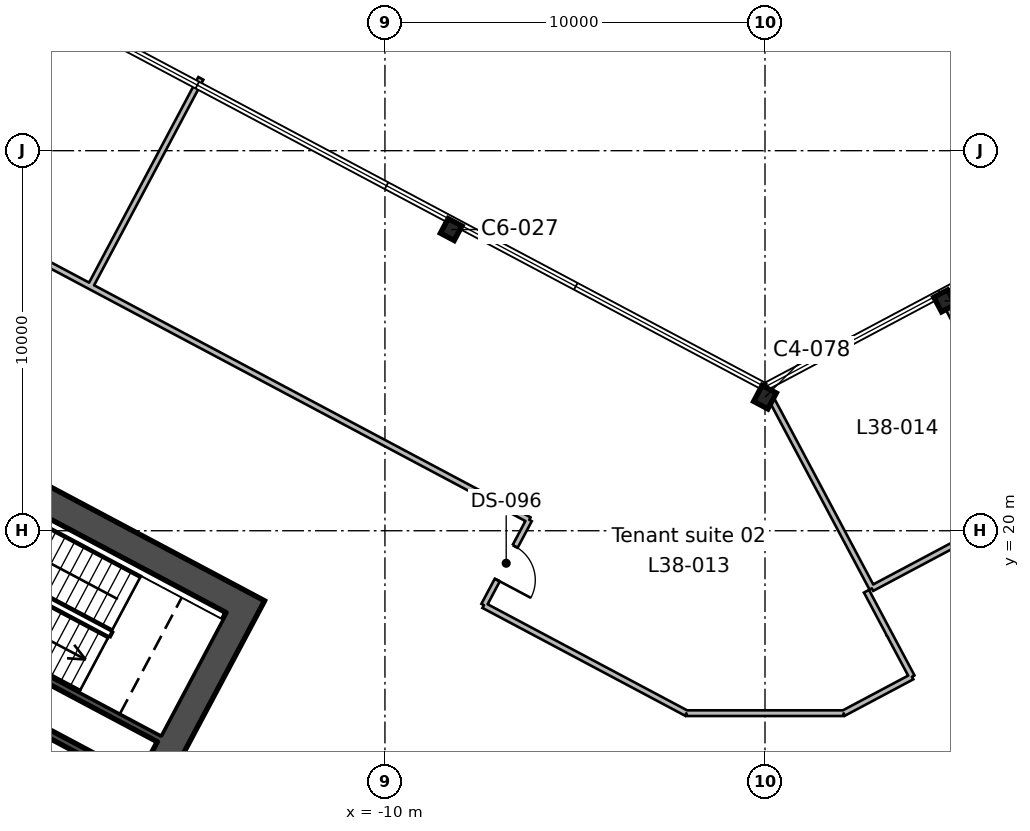
"""IFC4 building model, lengths in metres.
Left out: names, types, materials, properties, quantities, classifications, styles, units other than length and angle.
Written with IfcOpenShell. Run it as: python <this file> out.ifc"""

import sys

from ifc_helpers import new_model, si_unit, direction, frame, frame_2d, origin, origin_2d, place, context, subcontext, project, spatial, rectangle, i_section, extrude, element, fill, save


model = new_model("IFC4")
c1 = context("Model", 3, precision=1e-05, world=origin(), true_north=direction((0.0, 1.0)))
c2 = subcontext(c1, "Body", "Model", "MODEL_VIEW")
j1 = project(units=[si_unit("LENGTHUNIT", "METRE"), si_unit("PLANEANGLEUNIT", "RADIAN")], contexts=[c1])
p1 = place(None, origin())
s1 = spatial("IfcSite", under=j1, at=p1, CompositionType="ELEMENT")
p2 = place(p1, origin())
s2 = spatial("IfcBuilding", under=s1, at=p2, CompositionType="ELEMENT")
p3 = place(p2, frame((0.0, 0.0, 178.2)))
s3 = spatial("IfcBuildingStorey", under=s2, at=p3, CompositionType="ELEMENT", Elevation=178.2)
p4 = place(p3, frame((0.0, 23.514, 0.0), z_axis=(0.0, 0.0, 1.0), x_axis=(-0.882947592859, 0.469471562786, 0.0)))
e1 = element("IfcColumn", 1, at=p4, inside=s3, PredefinedType="COLUMN", context=c2, shape_type="SweptSolid", body=[
    extrude(i_section(OverallWidth=0.424, OverallDepth=0.475, WebThickness=0.048, FlangeThickness=0.077, FilletRadius=0.015, at=origin_2d()), origin(), (0.0, 0.0, 1.0), 5.4),
])
for number, where, z_axis, x_axis in (
    (2, (4.725, 26.047, 0.0), (0.0, 0.0, 1.0), (-0.883, -0.469, 0.0)),
    (3, (-8.257, 27.925, 0.0), (0.0, 0.0, 1.0), (-0.883, 0.469, 0.0)),
):
    element("IfcColumn", number, at=place(p3, frame(where, z_axis=z_axis, x_axis=x_axis)), inside=s3, PredefinedType="COLUMN", context=c2, shape_type="SweptSolid", body=[
        extrude(i_section(OverallWidth=0.412, OverallDepth=0.434, WebThickness=0.036, FlangeThickness=0.057, FilletRadius=0.015, at=origin_2d()), origin(), (0.0, 0.0, 1.0), 5.4),
    ])
p5 = place(p3, frame((-13.498, 18.333, 0.0), z_axis=(0.0, 0.0, 1.0), x_axis=(-0.469469918705, -0.88294846703, 0.0)))
e4 = element("IfcWall", 4, at=p5, inside=s3, PredefinedType="SHEAR", context=c2, shape_type="SweptSolid", body=[
    extrude(rectangle(XDim=19.7, YDim=0.75, at=frame_2d((9.85, 0.0))), origin(), (0.0, 0.0, 1.0), 5.4),
])
p6 = place(p5, frame((6.85, 0.0, 0.0)))
e5 = element("IfcOpeningElement", 5, at=p6, cuts=e4, PredefinedType="OPENING", context=c2, shape_type="SweptSolid", body=[
    extrude(rectangle(XDim=2.4, YDim=2.4, at=frame_2d((1.2, 1.2))), frame((0.0, 0.385, 0.0), z_axis=(0.0, -1.0, 0.0), x_axis=(1.0, 0.0, 0.0)), (0.0, 0.0, 1.0), 0.77),
])
p7 = place(p3, frame((-14.005, 18.178, 0.0), z_axis=(0.0, 0.0, 1.0), x_axis=(-0.88295010195, 0.469466843842, 0.0)))
e6 = element("IfcWall", 6, at=p7, inside=s3, PredefinedType="SHEAR", context=c2, shape_type="SweptSolid", body=[
    extrude(rectangle(XDim=20.2, YDim=0.75, at=frame_2d((10.1, 0.0))), origin(), (0.0, 0.0, 1.0), 5.4),
])
p8 = place(p3, frame((-15.942, 14.536, 0.0), z_axis=(0.0, 0.0, 1.0), x_axis=(-0.882946947542, 0.469472776449, 0.0)))
e7 = element("IfcWall", 7, at=p8, inside=s3, PredefinedType="SHEAR", context=c2, shape_type="SweptSolid", body=[
    extrude(rectangle(XDim=8.0, YDim=0.2, at=frame_2d((4.0, 0.0))), origin(), (0.0, 0.0, 1.0), 5.4),
])
p9 = place(p3, frame((-16.529, 13.432, 0.0), z_axis=(0.0, 0.0, 1.0), x_axis=(-0.88295287151, 0.469461634952, 0.0)))
e8 = element("IfcWall", 8, at=p9, inside=s3, PredefinedType="SHEAR", context=c2, shape_type="SweptSolid", body=[
    extrude(rectangle(XDim=8.0, YDim=0.2, at=frame_2d((4.0, 0.0))), origin(), (0.0, 0.0, 1.0), 5.4),
])
p10 = place(p3, frame((-32.694, 34.372, 0.0), z_axis=(0.0, 0.0, 1.0), x_axis=(0.882941399111, -0.469483211346, 0.0)))
e9 = element("IfcWall", 9, at=p10, inside=s3, PredefinedType="PARTITIONING", context=c2, shape_type="SweptSolid", body=[
    extrude(rectangle(XDim=18.067, YDim=0.15, at=frame_2d((9.034, 0.0))), origin(), (0.0, 0.0, 1.0), 4.95),
])
p11 = place(p10, frame((8.55, 0.0, 0.0)))
e10 = element("IfcOpeningElement", 10, at=p11, cuts=e9, PredefinedType="OPENING", context=c2, shape_type="SweptSolid", body=[
    extrude(rectangle(XDim=1.0, YDim=2.1, at=frame_2d((0.5, 1.05))), frame((0.0, 0.085, 0.0), z_axis=(0.0, -1.0, 0.0), x_axis=(1.0, 0.0, 0.0)), (0.0, 0.0, 1.0), 0.17),
])
p12 = place(p3, frame((-14.844, 31.903, 0.0), z_axis=(0.0, 0.0, 1.0), x_axis=(-0.469314518965, -0.883031076627, 0.0)))
e11 = element("IfcWall", 11, at=p12, inside=s3, PredefinedType="PARTITIONING", context=c2, shape_type="SweptSolid", body=[
    extrude(rectangle(XDim=6.2, YDim=0.15, at=frame_2d((3.1, 0.0))), origin(), (0.0, 0.0, 1.0), 4.95),
])
p13 = place(p3, frame((-7.396, 18.041, 0.0), z_axis=(0.0, 0.0, 1.0), x_axis=(0.469117793388, 0.883135604495, 0.0)))
e12 = element("IfcWall", 12, at=p13, inside=s3, PredefinedType="PARTITIONING", context=c2, shape_type="SweptSolid", body=[
    extrude(rectangle(XDim=2.543, YDim=0.15, at=frame_2d((1.271, 0.0))), origin(), (0.0, 0.0, 1.0), 4.95),
])
p14 = place(p13, frame((0.75, 0.0, 0.0)))
e13 = element("IfcOpeningElement", 13, at=p14, cuts=e12, PredefinedType="OPENING", context=c2, shape_type="SweptSolid", body=[
    extrude(rectangle(XDim=1.0, YDim=2.1, at=frame_2d((0.5, 1.05))), frame((0.0, 0.085, 0.0), z_axis=(0.0, -1.0, 0.0), x_axis=(1.0, 0.0, 0.0)), (0.0, 0.0, 1.0), 0.17),
])
p15 = place(p3, frame((-16.742, 25.89, 0.0), z_axis=(0.0, 0.0, 1.0), x_axis=(0.882955727844, -0.469456262784, 0.0)))
e14 = element("IfcWall", 14, at=p15, inside=s3, PredefinedType="PARTITIONING", context=c2, shape_type="SweptSolid", body=[
    extrude(rectangle(XDim=11.937, YDim=0.15, at=frame_2d((5.969, 0.0))), origin(), (0.0, 0.0, 1.0), 4.95),
])
p16 = place(p3, frame((-7.399, 18.035, 0.0), z_axis=(0.0, 0.0, 1.0), x_axis=(0.882911979877, -0.469538534936, 0.0)))
e15 = element("IfcWall", 15, at=p16, inside=s3, PredefinedType="PARTITIONING", context=c2, shape_type="SweptSolid", body=[
    extrude(rectangle(XDim=6.038, YDim=0.15, at=frame_2d((3.019, 0.0))), origin(), (0.0, 0.0, 1.0), 4.95),
])
p17 = place(p3, frame((-2.068, 15.2, 0.0), z_axis=(0.0, 0.0, 1.0), x_axis=(1.0, 0.0, 0.0)))
e16 = element("IfcWall", 16, at=p17, inside=s3, PredefinedType="PARTITIONING", context=c2, shape_type="SweptSolid", body=[
    extrude(rectangle(XDim=4.136, YDim=0.15, at=frame_2d((2.068, 0.0))), origin(), (0.0, 0.0, 1.0), 4.95),
])
p18 = place(p3, frame((2.068, 15.2, 0.0), z_axis=(0.0, 0.0, 1.0), x_axis=(0.882935773264, 0.469493791535, 0.0)))
e17 = element("IfcWall", 17, at=p18, inside=s3, PredefinedType="PARTITIONING", context=c2, shape_type="SweptSolid", body=[
    extrude(rectangle(XDim=2.038, YDim=0.15, at=frame_2d((1.019, 0.0))), origin(), (0.0, 0.0, 1.0), 4.95),
])
p19 = place(p3, frame((3.868, 16.157, 0.0), z_axis=(0.0, 0.0, 1.0), x_axis=(-0.470100170068, 0.882613069302, 0.0)))
e18 = element("IfcWall", 18, at=p19, inside=s3, PredefinedType="PARTITIONING", context=c2, shape_type="SweptSolid", body=[
    extrude(rectangle(XDim=1.246, YDim=0.15, at=frame_2d((0.623, 0.0))), origin(), (0.0, 0.0, 1.0), 4.95),
])
p20 = place(p3, frame((0.191, 23.422, 0.0), z_axis=(0.0, 0.0, 1.0), x_axis=(0.469672354087, -0.882840800941, 0.0)))
e19 = element("IfcWall", 19, at=p20, inside=s3, PredefinedType="PARTITIONING", context=c2, shape_type="SweptSolid", body=[
    extrude(rectangle(XDim=5.591, YDim=0.15, at=frame_2d((2.795, 0.0))), origin(), (0.0, 0.0, 1.0), 4.95),
])
p21 = place(p3, frame((4.822, 25.853, 0.0), z_axis=(0.0, 0.0, 1.0), x_axis=(0.469505986895, -0.882929288375, 0.0)))
e20 = element("IfcWall", 20, at=p21, inside=s3, PredefinedType="PARTITIONING", context=c2, shape_type="SweptSolid", body=[
    extrude(rectangle(XDim=5.563, YDim=0.15, at=frame_2d((2.782, 0.0))), origin(), (0.0, 0.0, 1.0), 4.95),
])
p22 = place(p3, frame((2.811, 18.483, 0.0), z_axis=(0.0, 0.0, 1.0), x_axis=(0.882947985302, 0.469470824707, 0.0)))
e21 = element("IfcWall", 21, at=p22, inside=s3, PredefinedType="PARTITIONING", context=c2, shape_type="SweptSolid", body=[
    extrude(rectangle(XDim=18.116, YDim=0.15, at=frame_2d((9.058, 0.0))), origin(), (0.0, 0.0, 1.0), 4.95),
])
p23 = place(p22, frame((15.05, 0.0, 0.0)))
e22 = element("IfcOpeningElement", 22, at=p23, cuts=e21, PredefinedType="OPENING", context=c2, shape_type="SweptSolid", body=[
    extrude(rectangle(XDim=1.0, YDim=2.1, at=frame_2d((0.5, 1.05))), frame((0.0, 0.085, 0.0), z_axis=(0.0, -1.0, 0.0), x_axis=(1.0, 0.0, 0.0)), (0.0, 0.0, 1.0), 0.17),
])
p24 = place(p22, frame((8.55, 0.0, 0.0)))
e23 = element("IfcOpeningElement", 23, at=p24, cuts=e21, PredefinedType="OPENING", context=c2, shape_type="SweptSolid", body=[
    extrude(rectangle(XDim=1.0, YDim=2.1, at=frame_2d((0.5, 1.05))), frame((0.0, 0.085, 0.0), z_axis=(0.0, -1.0, 0.0), x_axis=(1.0, 0.0, 0.0)), (0.0, 0.0, 1.0), 0.17),
])
p25 = place(p22, frame((4.05, 0.0, 0.0)))
e24 = element("IfcOpeningElement", 24, at=p25, cuts=e21, PredefinedType="OPENING", context=c2, shape_type="SweptSolid", body=[
    extrude(rectangle(XDim=1.0, YDim=2.1, at=frame_2d((0.5, 1.05))), frame((0.0, 0.085, 0.0), z_axis=(0.0, -1.0, 0.0), x_axis=(1.0, 0.0, 0.0)), (0.0, 0.0, 1.0), 0.17),
])
p26 = place(p3, frame((3.282, 17.257, 0.0), z_axis=(0.0, 0.0, 1.0), x_axis=(-0.469547742395, 0.882907083227, 0.0)))
e25 = element("IfcWall", 25, at=p26, inside=s3, PredefinedType="PARTITIONING", context=c2, shape_type="SweptSolid", body=[
    extrude(rectangle(XDim=1.303, YDim=0.15, at=frame_2d((0.652, 0.0))), origin(), (0.0, 0.0, 1.0), 4.95),
])
p27 = place(p14, frame((1.0, 0.0, 0.0), z_axis=(0.0, 0.0, 1.0), x_axis=(-1.0, 0.0, 0.0)))
e26 = element("IfcDoor", 26, at=p27, inside=s3, OperationType="SINGLE_SWING_RIGHT", PredefinedType="DOOR", context=c2, shape_type="SweptSolid", body=[
    extrude(rectangle(XDim=1.0, YDim=2.1, at=frame_2d((0.5, 1.05))), frame((0.0, 0.025, 0.0), z_axis=(0.0, -1.0, 0.0), x_axis=(1.0, 0.0, 0.0)), (0.0, 0.0, 1.0), 0.05),
])
fill(e13, e26)
save(model, sys.argv[1])
